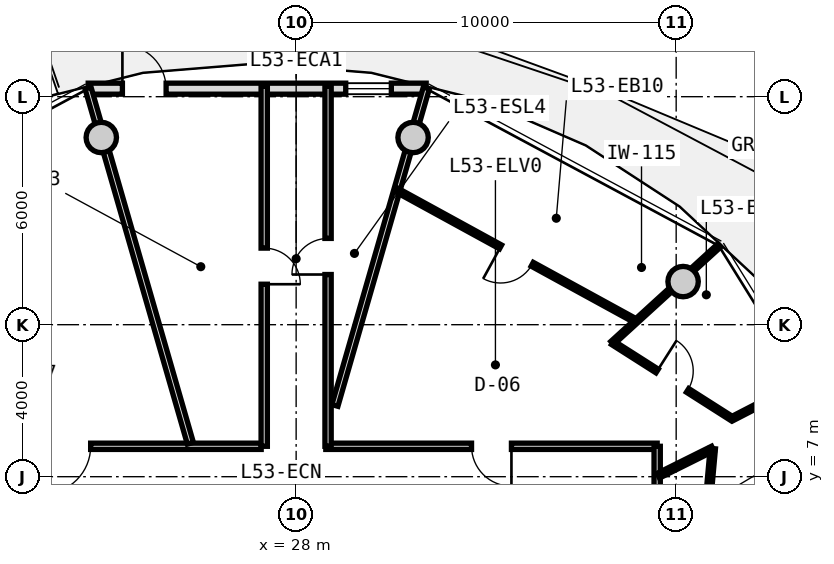
"""IFC4 building model, lengths in metres.
Left out: names, types, materials, properties, quantities, classifications, styles, units other than length and angle.
Written with IfcOpenShell. Run it as: python <this file> out.ifc"""

import sys

from ifc_helpers import new_model, si_unit, direction, frame, frame_2d, origin, origin_2d, place, context, subcontext, project, spatial, rectangle, circle, extrude, source, transform, mapped, element, fill, save


model = new_model("IFC4")
c1 = context("Model", 3, precision=1e-05, world=origin(), true_north=direction((0.0, 1.0)))
c2 = subcontext(c1, "Body", "Model", "MODEL_VIEW")
j1 = project(units=[si_unit("LENGTHUNIT", "METRE"), si_unit("PLANEANGLEUNIT", "RADIAN")], contexts=[c1])
p1 = place(None, origin())
s1 = spatial("IfcSite", under=j1, at=p1, CompositionType="ELEMENT")
p2 = place(p1, origin())
s2 = spatial("IfcBuilding", under=s1, at=p2, CompositionType="ELEMENT")
p3 = place(p2, frame((0.0, 0.0, 170.9)))
s3 = spatial("IfcBuildingStorey", under=s2, at=p3, CompositionType="ELEMENT", Elevation=170.9)
m1 = source(origin(), c2, "Body", "SweptSolid", [
    extrude(circle(Radius=0.4, at=origin_2d()), origin(), (0.0, 0.0, 1.0), 3.05),
])
for number, where, z_axis, x_axis in (
    (1, (38.183, 12.135, 0.0), (0.0, 0.0, 1.0), (1.0, 0.0, 0.0)),
    (2, (31.077, 15.926, 0.0), (0.0, 0.0, 1.0), (1.0, 0.0, 0.0)),
    (3, (22.873, 15.926, 0.0), (0.0, 0.0, 1.0), (1.0, 0.0, 0.0)),
):
    element("IfcColumn", number, at=place(p3, frame(where, z_axis=z_axis, x_axis=x_axis)), inside=s3, PredefinedType="COLUMN", context=c2, shape_type="MappedRepresentation", body=[
        mapped(m1, transform((0.0, 0.0, 0.0), x_axis=(1.0, 0.0, 0.0), y_axis=(0.0, 1.0, 0.0), z_axis=(0.0, 0.0, 1.0), scale=1.0)),
    ])
m2 = source(origin(), c2, "Body", "SweptSolid", [
    extrude(rectangle(XDim=8.893, YDim=0.29, at=frame_2d((4.447, 0.0))), origin(), (0.0, 0.0, 1.0), 2.81),
])
p4 = place(p3, frame((22.529, 17.211, 0.0), z_axis=(0.0, 0.0, 1.0), x_axis=(1.0, 0.0, 0.0)))
e4 = element("IfcWall", 4, at=p4, inside=s3, PredefinedType="SOLIDWALL", context=c2, shape_type="MappedRepresentation", body=[
    mapped(m2, transform((0.0, 0.0, 0.0), x_axis=(1.0, 0.0, 0.0), y_axis=(0.0, 1.0, 0.0), z_axis=(0.0, 0.0, 1.0), scale=1.0)),
])
p5 = place(p4, frame((0.9, 0.0, 0.0)))
e5 = element("IfcOpeningElement", 5, at=p5, cuts=e4, PredefinedType="OPENING", context=c2, shape_type="SweptSolid", body=[
    extrude(rectangle(XDim=1.15, YDim=2.25, at=frame_2d((0.575, 1.125))), frame((0.0, 0.155, 0.0), z_axis=(0.0, -1.0, 0.0), x_axis=(1.0, 0.0, 0.0)), (0.0, 0.0, 1.0), 0.31),
])
p6 = place(p4, frame((6.777, 0.0, 0.85)))
e6 = element("IfcOpeningElement", 6, at=p6, cuts=e4, PredefinedType="OPENING", context=c2, shape_type="SweptSolid", body=[
    extrude(rectangle(XDim=1.2, YDim=1.5, at=frame_2d((0.6, 0.75))), frame((0.0, 0.155, 0.0), z_axis=(0.0, -1.0, 0.0), x_axis=(1.0, 0.0, 0.0)), (0.0, 0.0, 1.0), 0.31),
])
m3 = source(origin(), c2, "Body", "SweptSolid", [
    extrude(rectangle(XDim=8.58, YDim=0.165, at=frame_2d((4.29, 0.0))), origin(), (0.0, 0.0, 1.0), 2.795),
])
p7 = place(p3, frame((18.5, 7.8, 0.0), z_axis=(0.0, 0.0, 1.0), x_axis=(1.0, 0.0, 0.0)))
e7 = element("IfcWall", 7, at=p7, inside=s3, PredefinedType="PARTITIONING", context=c2, shape_type="MappedRepresentation", body=[
    mapped(m3, transform((0.0, 0.0, 0.0), x_axis=(1.0, 0.0, 0.0), y_axis=(0.0, 1.0, 0.0), z_axis=(0.0, 0.0, 1.0), scale=1.0)),
])
p8 = place(p7, frame((2.843, 0.0, 0.0)))
e8 = element("IfcOpeningElement", 8, at=p8, cuts=e7, PredefinedType="OPENING", context=c2, shape_type="SweptSolid", body=[
    extrude(rectangle(XDim=1.25, YDim=2.2, at=frame_2d((0.625, 1.1))), frame((0.0, 0.093, 0.0), z_axis=(0.0, -1.0, 0.0), x_axis=(1.0, 0.0, 0.0)), (0.0, 0.0, 1.0), 0.185),
])
m4 = source(origin(), c2, "Body", "SweptSolid", [
    extrude(rectangle(XDim=8.719, YDim=0.165, at=frame_2d((4.36, 0.0))), origin(), (0.0, 0.0, 1.0), 2.795),
])
p9 = place(p3, frame((28.781, 7.8, 0.0), z_axis=(0.0, 0.0, 1.0), x_axis=(1.0, 0.0, 0.0)))
e9 = element("IfcWall", 9, at=p9, inside=s3, PredefinedType="PARTITIONING", context=c2, shape_type="MappedRepresentation", body=[
    mapped(m4, transform((0.0, 0.0, 0.0), x_axis=(1.0, 0.0, 0.0), y_axis=(0.0, 1.0, 0.0), z_axis=(0.0, 0.0, 1.0), scale=1.0)),
])
p10 = place(p9, frame((3.835, 0.0, 0.0)))
e10 = element("IfcOpeningElement", 10, at=p10, cuts=e9, PredefinedType="OPENING", context=c2, shape_type="SweptSolid", body=[
    extrude(rectangle(XDim=1.05, YDim=2.15, at=frame_2d((0.525, 1.075))), frame((0.0, 0.093, 0.0), z_axis=(0.0, -1.0, 0.0), x_axis=(1.0, 0.0, 0.0)), (0.0, 0.0, 1.0), 0.185),
])
m5 = source(origin(), c2, "Body", "SweptSolid", [
    extrude(rectangle(XDim=6.88, YDim=0.165, at=frame_2d((3.44, 0.0))), origin(), (0.0, 0.0, 1.0), 2.795),
])
p11 = place(p3, frame((37.5, 7.8, 0.0), z_axis=(0.0, 0.0, 1.0), x_axis=(0.0, -1.0, 0.0)))
e11 = element("IfcWall", 11, at=p11, inside=s3, PredefinedType="PARTITIONING", context=c2, shape_type="MappedRepresentation", body=[
    mapped(m5, transform((0.0, 0.0, 0.0), x_axis=(1.0, 0.0, 0.0), y_axis=(0.0, 1.0, 0.0), z_axis=(0.0, 0.0, 1.0), scale=1.0)),
])
m6 = source(origin(), c2, "Body", "SweptSolid", [
    extrude(rectangle(XDim=8.695, YDim=0.165, at=frame_2d((4.348, 0.0))), origin(), (0.0, 0.0, 1.0), 2.345),
])
p12 = place(p3, frame((29.02, 8.875, 0.0), z_axis=(0.0, 0.0, 1.0), x_axis=(0.276797231892, 0.960928349263, 0.0)))
e12 = element("IfcWall", 12, at=p12, inside=s3, PredefinedType="PARTITIONING", context=c2, shape_type="MappedRepresentation", body=[
    mapped(m6, transform((0.0, 0.0, 0.0), x_axis=(1.0, 0.0, 0.0), y_axis=(0.0, 1.0, 0.0), z_axis=(0.0, 0.0, 1.0), scale=1.0)),
])
m7 = source(origin(), c2, "Body", "SweptSolid", [
    extrude(rectangle(XDim=9.73, YDim=0.165, at=frame_2d((4.865, 0.0))), origin(), (0.0, 0.0, 1.0), 2.345),
])
p13 = place(p3, frame((25.217, 7.88, 0.0), z_axis=(0.0, 0.0, 1.0), x_axis=(-0.27679492614, 0.960929013436, 0.0)))
e13 = element("IfcWall", 13, at=p13, inside=s3, PredefinedType="PARTITIONING", context=c2, shape_type="MappedRepresentation", body=[
    mapped(m7, transform((0.0, 0.0, 0.0), x_axis=(1.0, 0.0, 0.0), y_axis=(0.0, 1.0, 0.0), z_axis=(0.0, 0.0, 1.0), scale=1.0)),
])
m8 = source(origin(), c2, "Body", "SweptSolid", [
    extrude(rectangle(XDim=9.48, YDim=0.165, at=frame_2d((4.74, 0.0))), origin(), (0.0, 0.0, 1.0), 2.795),
])
p14 = place(p3, frame((27.16, 7.8, 0.0), z_axis=(0.0, 0.0, 1.0), x_axis=(0.0, 1.0, 0.0)))
e14 = element("IfcWall", 14, at=p14, inside=s3, PredefinedType="PARTITIONING", context=c2, shape_type="MappedRepresentation", body=[
    mapped(m8, transform((0.0, 0.0, 0.0), x_axis=(1.0, 0.0, 0.0), y_axis=(0.0, 1.0, 0.0), z_axis=(0.0, 0.0, 1.0), scale=1.0)),
])
p15 = place(p14, frame((4.265, 0.0, 0.0)))
e15 = element("IfcOpeningElement", 15, at=p15, cuts=e14, PredefinedType="OPENING", context=c2, shape_type="SweptSolid", body=[
    extrude(rectangle(XDim=0.95, YDim=2.1, at=frame_2d((0.475, 1.05))), frame((0.0, 0.093, 0.0), z_axis=(0.0, -1.0, 0.0), x_axis=(1.0, 0.0, 0.0)), (0.0, 0.0, 1.0), 0.185),
])
p16 = place(p3, frame((28.84, 17.28, 0.0), z_axis=(0.0, 0.0, 1.0), x_axis=(0.0, -1.0, 0.0)))
e16 = element("IfcWall", 16, at=p16, inside=s3, PredefinedType="PARTITIONING", context=c2, shape_type="MappedRepresentation", body=[
    mapped(m8, transform((0.0, 0.0, 0.0), x_axis=(1.0, 0.0, 0.0), y_axis=(0.0, 1.0, 0.0), z_axis=(0.0, 0.0, 1.0), scale=1.0)),
])
p17 = place(p16, frame((4.01, 0.0, 0.0)))
e17 = element("IfcOpeningElement", 17, at=p17, cuts=e16, PredefinedType="OPENING", context=c2, shape_type="SweptSolid", body=[
    extrude(rectangle(XDim=0.95, YDim=2.1, at=frame_2d((0.475, 1.05))), frame((0.0, 0.093, 0.0), z_axis=(0.0, -1.0, 0.0), x_axis=(1.0, 0.0, 0.0)), (0.0, 0.0, 1.0), 0.185),
])
m9 = source(origin(), c2, "Body", "SweptSolid", [
    extrude(rectangle(XDim=7.167, YDim=0.115, at=frame_2d((3.583, 0.0))), origin(), (0.0, 0.0, 1.0), 2.795),
])
p18 = place(p3, frame((36.939, 11.098, 0.0), z_axis=(0.0, 0.0, 1.0), x_axis=(-0.8771628907, 0.480192943699, 0.0)))
e18 = element("IfcWall", 18, at=p18, inside=s3, PredefinedType="PARTITIONING", context=c2, shape_type="MappedRepresentation", body=[
    mapped(m9, transform((0.0, 0.0, 0.0), x_axis=(1.0, 0.0, 0.0), y_axis=(0.0, 1.0, 0.0), z_axis=(0.0, 0.0, 1.0), scale=1.0)),
])
p19 = place(p18, frame((3.108, 0.0, 0.0)))
e19 = element("IfcOpeningElement", 19, at=p19, cuts=e18, PredefinedType="OPENING", context=c2, shape_type="SweptSolid", body=[
    extrude(rectangle(XDim=0.95, YDim=2.1, at=frame_2d((0.475, 1.05))), frame((0.0, 0.067, 0.0), z_axis=(0.0, -1.0, 0.0), x_axis=(1.0, 0.0, 0.0)), (0.0, 0.0, 1.0), 0.135),
])
m10 = source(origin(), c2, "Body", "SweptSolid", [
    extrude(rectangle(XDim=3.814, YDim=0.115, at=frame_2d((1.907, 0.0))), origin(), (0.0, 0.0, 1.0), 2.345),
])
p20 = place(p3, frame((36.319, 10.518, 0.0), z_axis=(0.0, 0.0, 1.0), x_axis=(0.73871962024, 0.674012850524, 0.0)))
e20 = element("IfcWall", 20, at=p20, inside=s3, PredefinedType="PARTITIONING", context=c2, shape_type="MappedRepresentation", body=[
    mapped(m10, transform((0.0, 0.0, 0.0), x_axis=(1.0, 0.0, 0.0), y_axis=(0.0, 1.0, 0.0), z_axis=(0.0, 0.0, 1.0), scale=1.0)),
])
m11 = source(origin(), c2, "Body", "SweptSolid", [
    extrude(rectangle(XDim=1.601, YDim=0.14, at=frame_2d((0.801, 0.0))), origin(), (0.0, 0.0, 1.0), 2.795),
])
p21 = place(p3, frame((37.53, 7.026, 0.0), z_axis=(0.0, 0.0, 1.0), x_axis=(0.895279369592, 0.445505163138, 0.0)))
e21 = element("IfcWall", 21, at=p21, inside=s3, PredefinedType="PARTITIONING", context=c2, shape_type="MappedRepresentation", body=[
    mapped(m11, transform((0.0, 0.0, 0.0), x_axis=(1.0, 0.0, 0.0), y_axis=(0.0, 1.0, 0.0), z_axis=(0.0, 0.0, 1.0), scale=1.0)),
])
m12 = source(origin(), c2, "Body", "SweptSolid", [
    extrude(rectangle(XDim=3.058, YDim=0.14, at=frame_2d((1.529, 0.0))), origin(), (0.0, 0.0, 1.0), 2.795),
])
p22 = place(p3, frame((38.964, 7.74, 0.0), z_axis=(0.0, 0.0, 1.0), x_axis=(-0.090060616512, -0.99593628579, 0.0)))
e22 = element("IfcWall", 22, at=p22, inside=s3, PredefinedType="PARTITIONING", context=c2, shape_type="MappedRepresentation", body=[
    mapped(m12, transform((0.0, 0.0, 0.0), x_axis=(1.0, 0.0, 0.0), y_axis=(0.0, 1.0, 0.0), z_axis=(0.0, 0.0, 1.0), scale=1.0)),
])
p23 = place(p22, frame((1.069, 0.0, 0.0)))
e23 = element("IfcOpeningElement", 23, at=p23, cuts=e22, PredefinedType="OPENING", context=c2, shape_type="SweptSolid", body=[
    extrude(rectangle(XDim=0.92, YDim=2.1, at=frame_2d((0.46, 1.05))), frame((0.0, 0.08, 0.0), z_axis=(0.0, -1.0, 0.0), x_axis=(1.0, 0.0, 0.0)), (0.0, 0.0, 1.0), 0.16),
])
m13 = source(origin(), c2, "Body", "SweptSolid", [
    extrude(rectangle(XDim=2.13, YDim=0.115, at=frame_2d((1.065, 0.0))), origin(), (0.0, 0.0, 1.0), 2.795),
])
p24 = place(p3, frame((39.471, 8.525, 0.0), z_axis=(0.0, 0.0, 1.0), x_axis=(0.888504584778, 0.458867740016, 0.0)))
e24 = element("IfcWall", 24, at=p24, inside=s3, PredefinedType="PARTITIONING", context=c2, shape_type="MappedRepresentation", body=[
    mapped(m13, transform((0.0, 0.0, 0.0), x_axis=(1.0, 0.0, 0.0), y_axis=(0.0, 1.0, 0.0), z_axis=(0.0, 0.0, 1.0), scale=1.0)),
])
m14 = source(origin(), c2, "Body", "SweptSolid", [
    extrude(rectangle(XDim=3.725, YDim=0.115, at=frame_2d((1.863, 0.0))), origin(), (0.0, 0.0, 1.0), 2.795),
])
p25 = place(p3, frame((39.471, 8.525, 0.0), z_axis=(0.0, 0.0, 1.0), x_axis=(-0.843453635564, 0.537201977523, 0.0)))
e25 = element("IfcWall", 25, at=p25, inside=s3, PredefinedType="PARTITIONING", context=c2, shape_type="MappedRepresentation", body=[
    mapped(m14, transform((0.0, 0.0, 0.0), x_axis=(1.0, 0.0, 0.0), y_axis=(0.0, 1.0, 0.0), z_axis=(0.0, 0.0, 1.0), scale=1.0)),
])
p26 = place(p25, frame((1.388, 0.0, 0.0)))
e26 = element("IfcOpeningElement", 26, at=p26, cuts=e25, PredefinedType="OPENING", context=c2, shape_type="SweptSolid", body=[
    extrude(rectangle(XDim=0.95, YDim=2.1, at=frame_2d((0.475, 1.05))), frame((0.0, 0.067, 0.0), z_axis=(0.0, -1.0, 0.0), x_axis=(1.0, 0.0, 0.0)), (0.0, 0.0, 1.0), 0.135),
])
m15 = source(origin(), c2, "Body", "SweptSolid", [
    extrude(rectangle(XDim=1.15, YDim=2.25, at=frame_2d((0.575, 1.125))), frame((0.0, 0.025, 0.0), z_axis=(0.0, -1.0, 0.0), x_axis=(1.0, 0.0, 0.0)), (0.0, 0.0, 1.0), 0.05),
])
p27 = place(p5, origin())
e27 = element("IfcDoor", 27, at=p27, inside=s3, OperationType="SINGLE_SWING_LEFT", PredefinedType="DOOR", context=c2, shape_type="MappedRepresentation", body=[
    mapped(m15, transform((0.0, 0.0, 0.0), x_axis=(1.0, 0.0, 0.0), y_axis=(0.0, 1.0, 0.0), z_axis=(0.0, 0.0, 1.0), scale=1.0)),
])
fill(e5, e27)
m16 = source(origin(), c2, "Body", "SweptSolid", [
    extrude(rectangle(XDim=1.2, YDim=1.5, at=frame_2d((0.6, 0.75))), frame((0.0, 0.03, 0.0), z_axis=(0.0, -1.0, 0.0), x_axis=(1.0, 0.0, 0.0)), (0.0, 0.0, 1.0), 0.06),
])
p28 = place(p6, origin())
e28 = element("IfcWindow", 28, at=p28, inside=s3, PartitioningType="SINGLE_PANEL", PredefinedType="WINDOW", context=c2, shape_type="MappedRepresentation", body=[
    mapped(m16, transform((0.0, 0.0, 0.0), x_axis=(1.0, 0.0, 0.0), y_axis=(0.0, 1.0, 0.0), z_axis=(0.0, 0.0, 1.0), scale=1.0)),
])
fill(e6, e28)
m17 = source(origin(), c2, "Body", "SweptSolid", [
    extrude(rectangle(XDim=0.95, YDim=2.1, at=frame_2d((0.475, 1.05))), frame((0.0, 0.025, 0.0), z_axis=(0.0, -1.0, 0.0), x_axis=(1.0, 0.0, 0.0)), (0.0, 0.0, 1.0), 0.05),
])
p29 = place(p15, frame((0.95, 0.0, 0.0), z_axis=(0.0, 0.0, 1.0), x_axis=(-1.0, 0.0, 0.0)))
e29 = element("IfcDoor", 29, at=p29, inside=s3, OperationType="SINGLE_SWING_RIGHT", PredefinedType="DOOR", context=c2, shape_type="MappedRepresentation", body=[
    mapped(m17, transform((0.0, 0.0, 0.0), x_axis=(1.0, 0.0, 0.0), y_axis=(0.0, 1.0, 0.0), z_axis=(0.0, 0.0, 1.0), scale=1.0)),
])
fill(e15, e29)
p30 = place(p17, frame((0.95, 0.0, 0.0), z_axis=(0.0, 0.0, 1.0), x_axis=(-1.0, 0.0, 0.0)))
e30 = element("IfcDoor", 30, at=p30, inside=s3, OperationType="SINGLE_SWING_LEFT", PredefinedType="DOOR", context=c2, shape_type="MappedRepresentation", body=[
    mapped(m17, transform((0.0, 0.0, 0.0), x_axis=(1.0, 0.0, 0.0), y_axis=(0.0, 1.0, 0.0), z_axis=(0.0, 0.0, 1.0), scale=1.0)),
])
fill(e17, e30)
m18 = source(origin(), c2, "Body", "SweptSolid", [
    extrude(rectangle(XDim=1.05, YDim=2.15, at=frame_2d((0.525, 1.075))), frame((0.0, 0.025, 0.0), z_axis=(0.0, -1.0, 0.0), x_axis=(1.0, 0.0, 0.0)), (0.0, 0.0, 1.0), 0.05),
])
p31 = place(p10, frame((1.05, 0.0, 0.0), z_axis=(0.0, 0.0, 1.0), x_axis=(-1.0, 0.0, 0.0)))
e31 = element("IfcDoor", 31, at=p31, inside=s3, OperationType="SINGLE_SWING_LEFT", PredefinedType="DOOR", context=c2, shape_type="MappedRepresentation", body=[
    mapped(m18, transform((0.0, 0.0, 0.0), x_axis=(1.0, 0.0, 0.0), y_axis=(0.0, 1.0, 0.0), z_axis=(0.0, 0.0, 1.0), scale=1.0)),
])
fill(e10, e31)
p32 = place(p26, frame((0.95, 0.0, 0.0), z_axis=(0.0, 0.0, 1.0), x_axis=(-1.0, 0.0, 0.0)))
e32 = element("IfcDoor", 32, at=p32, inside=s3, OperationType="SINGLE_SWING_LEFT", PredefinedType="DOOR", context=c2, shape_type="MappedRepresentation", body=[
    mapped(m17, transform((0.0, 0.0, 0.0), x_axis=(1.0, 0.0, 0.0), y_axis=(0.0, 1.0, 0.0), z_axis=(0.0, 0.0, 1.0), scale=1.0)),
])
fill(e26, e32)
p33 = place(p19, origin())
e33 = element("IfcDoor", 33, at=p33, inside=s3, OperationType="SINGLE_SWING_RIGHT", PredefinedType="DOOR", context=c2, shape_type="MappedRepresentation", body=[
    mapped(m17, transform((0.0, 0.0, 0.0), x_axis=(1.0, 0.0, 0.0), y_axis=(0.0, 1.0, 0.0), z_axis=(0.0, 0.0, 1.0), scale=1.0)),
])
fill(e19, e33)
m19 = source(origin(), c2, "Body", "SweptSolid", [
    extrude(rectangle(XDim=1.25, YDim=2.2, at=frame_2d((0.625, 1.1))), frame((0.0, 0.025, 0.0), z_axis=(0.0, -1.0, 0.0), x_axis=(1.0, 0.0, 0.0)), (0.0, 0.0, 1.0), 0.05),
])
p34 = place(p8, frame((1.25, 0.0, 0.0), z_axis=(0.0, 0.0, 1.0), x_axis=(-1.0, 0.0, 0.0)))
e34 = element("IfcDoor", 34, at=p34, inside=s3, OperationType="SINGLE_SWING_RIGHT", PredefinedType="DOOR", context=c2, shape_type="MappedRepresentation", body=[
    mapped(m19, transform((0.0, 0.0, 0.0), x_axis=(1.0, 0.0, 0.0), y_axis=(0.0, 1.0, 0.0), z_axis=(0.0, 0.0, 1.0), scale=1.0)),
])
fill(e8, e34)
save(model, sys.argv[1])
